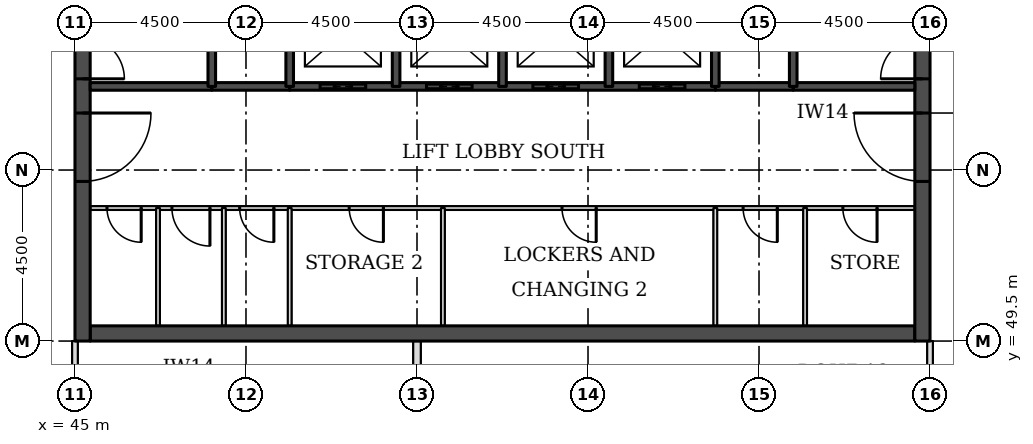
"""IFC4 building model, lengths in metres.
Left out: names, types, materials, properties, quantities, classifications, styles, units other than length and angle.
Written with IfcOpenShell. Run it as: python <this file> out.ifc"""

import sys

from ifc_helpers import new_model, si_unit, direction, frame, frame_2d, origin, place, context, subcontext, project, spatial, rectangle, extrude, element, fill, save


model = new_model("IFC4")
c1 = context("Model", 3, precision=1e-05, world=origin(), true_north=direction((0.0, 1.0)))
c2 = subcontext(c1, "Body", "Model", "MODEL_VIEW")
j1 = project(units=[si_unit("LENGTHUNIT", "METRE"), si_unit("PLANEANGLEUNIT", "RADIAN")], contexts=[c1])
p1 = place(None, origin())
s1 = spatial("IfcSite", under=j1, at=p1, CompositionType="ELEMENT")
p2 = place(p1, origin())
s2 = spatial("IfcBuilding", under=s1, at=p2, CompositionType="ELEMENT")
p3 = place(p2, frame((0.0, 0.0, 192.1)))
s3 = spatial("IfcBuildingStorey", under=s2, at=p3, CompositionType="ELEMENT", Elevation=192.1)
p4 = place(p3, frame((45.4, 49.7, 0.0), z_axis=(0.0, 0.0, 1.0), x_axis=(1.0, 0.0, 0.0)))
e1 = element("IfcWall", 1, at=p4, inside=s3, PredefinedType="SHEAR", context=c2, shape_type="SweptSolid", body=[
    extrude(rectangle(XDim=21.7, YDim=0.4, at=frame_2d((10.85, 0.0))), origin(), (0.0, 0.0, 1.0), 3.7),
])
p5 = place(p3, frame((45.2, 49.5, 0.0), z_axis=(0.0, 0.0, 1.0), x_axis=(0.0, 1.0, 0.0)))
e2 = element("IfcWall", 2, at=p5, inside=s3, PredefinedType="SHEAR", context=c2, shape_type="SweptSolid", body=[
    extrude(rectangle(XDim=22.5, YDim=0.4, at=frame_2d((11.25, 0.0))), origin(), (0.0, 0.0, 1.0), 3.7),
])
p6 = place(p5, frame((4.2, 0.0, 0.0)))
e3 = element("IfcOpeningElement", 3, at=p6, cuts=e2, PredefinedType="OPENING", context=c2, shape_type="SweptSolid", body=[
    extrude(rectangle(XDim=1.8, YDim=2.1, at=frame_2d((0.9, 1.05))), frame((0.0, 0.21, 0.0), z_axis=(0.0, -1.0, 0.0), x_axis=(1.0, 0.0, 0.0)), (0.0, 0.0, 1.0), 0.42),
])
p7 = place(p5, frame((6.9, 0.0, 0.0)))
e4 = element("IfcOpeningElement", 4, at=p7, cuts=e2, PredefinedType="OPENING", context=c2, shape_type="SweptSolid", body=[
    extrude(rectangle(XDim=1.1, YDim=2.1, at=frame_2d((0.55, 1.05))), frame((0.0, 0.21, 0.0), z_axis=(0.0, -1.0, 0.0), x_axis=(1.0, 0.0, 0.0)), (0.0, 0.0, 1.0), 0.42),
])
p8 = place(p5, frame((13.6, 0.0, 0.0)))
e5 = element("IfcOpeningElement", 5, at=p8, cuts=e2, PredefinedType="OPENING", context=c2, shape_type="SweptSolid", body=[
    extrude(rectangle(XDim=1.1, YDim=2.1, at=frame_2d((0.55, 1.05))), frame((0.0, 0.21, 0.0), z_axis=(0.0, -1.0, 0.0), x_axis=(1.0, 0.0, 0.0)), (0.0, 0.0, 1.0), 0.42),
])
p9 = place(p5, frame((16.5, 0.0, 0.0)))
e6 = element("IfcOpeningElement", 6, at=p9, cuts=e2, PredefinedType="OPENING", context=c2, shape_type="SweptSolid", body=[
    extrude(rectangle(XDim=1.8, YDim=2.1, at=frame_2d((0.9, 1.05))), frame((0.0, 0.21, 0.0), z_axis=(0.0, -1.0, 0.0), x_axis=(1.0, 0.0, 0.0)), (0.0, 0.0, 1.0), 0.42),
])
p10 = place(p3, frame((67.3, 49.5, 0.0), z_axis=(0.0, 0.0, 1.0), x_axis=(0.0, 1.0, 0.0)))
e7 = element("IfcWall", 7, at=p10, inside=s3, PredefinedType="SHEAR", context=c2, shape_type="SweptSolid", body=[
    extrude(rectangle(XDim=22.5, YDim=0.4, at=frame_2d((11.25, 0.0))), origin(), (0.0, 0.0, 1.0), 3.7),
])
p11 = place(p10, frame((4.2, 0.0, 0.0)))
e8 = element("IfcOpeningElement", 8, at=p11, cuts=e7, PredefinedType="OPENING", context=c2, shape_type="SweptSolid", body=[
    extrude(rectangle(XDim=1.8, YDim=2.1, at=frame_2d((0.9, 1.05))), frame((0.0, 0.21, 0.0), z_axis=(0.0, -1.0, 0.0), x_axis=(1.0, 0.0, 0.0)), (0.0, 0.0, 1.0), 0.42),
])
p12 = place(p10, frame((6.9, 0.0, 0.0)))
e9 = element("IfcOpeningElement", 9, at=p12, cuts=e7, PredefinedType="OPENING", context=c2, shape_type="SweptSolid", body=[
    extrude(rectangle(XDim=1.1, YDim=2.1, at=frame_2d((0.55, 1.05))), frame((0.0, 0.21, 0.0), z_axis=(0.0, -1.0, 0.0), x_axis=(1.0, 0.0, 0.0)), (0.0, 0.0, 1.0), 0.42),
])
p13 = place(p10, frame((13.6, 0.0, 0.0)))
e10 = element("IfcOpeningElement", 10, at=p13, cuts=e7, PredefinedType="OPENING", context=c2, shape_type="SweptSolid", body=[
    extrude(rectangle(XDim=1.1, YDim=2.1, at=frame_2d((0.55, 1.05))), frame((0.0, 0.21, 0.0), z_axis=(0.0, -1.0, 0.0), x_axis=(1.0, 0.0, 0.0)), (0.0, 0.0, 1.0), 0.42),
])
p14 = place(p10, frame((16.5, 0.0, 0.0)))
e11 = element("IfcOpeningElement", 11, at=p14, cuts=e7, PredefinedType="OPENING", context=c2, shape_type="SweptSolid", body=[
    extrude(rectangle(XDim=1.8, YDim=2.1, at=frame_2d((0.9, 1.05))), frame((0.0, 0.21, 0.0), z_axis=(0.0, -1.0, 0.0), x_axis=(1.0, 0.0, 0.0)), (0.0, 0.0, 1.0), 0.42),
])
p15 = place(p3, frame((54.0, 46.5, 0.0), z_axis=(0.0, 0.0, 1.0), x_axis=(0.0, 1.0, 0.0)))
e12 = element("IfcWall", 12, at=p15, inside=s3, PredefinedType="PARTITIONING", context=c2, shape_type="SweptSolid", body=[
    extrude(rectangle(XDim=3.0, YDim=0.2, at=frame_2d((1.5, 0.0))), origin(), (0.0, 0.0, 1.0), 3.55),
])
for number, where, z_axis, x_axis in (
    (13, (45.0, 48.0, 0.0), (0.0, 0.0, 1.0), (0.0, 1.0, 0.0)),
    (14, (67.5, 48.0, 0.0), (0.0, 0.0, 1.0), (0.0, 1.0, 0.0)),
):
    element("IfcWall", number, at=place(p3, frame(where, z_axis=z_axis, x_axis=x_axis)), inside=s3, PredefinedType="PARTITIONING", context=c2, shape_type="SweptSolid", body=[
        extrude(rectangle(XDim=1.5, YDim=0.15, at=frame_2d((0.75, 0.0))), origin(), (0.0, 0.0, 1.0), 3.022),
    ])
p16 = place(p3, frame((45.4, 53.0, 0.0), z_axis=(0.0, 0.0, 1.0), x_axis=(1.0, 0.0, 0.0)))
e15 = element("IfcWall", 15, at=p16, inside=s3, PredefinedType="PARTITIONING", context=c2, shape_type="SweptSolid", body=[
    extrude(rectangle(XDim=21.7, YDim=0.1, at=frame_2d((10.85, 0.0))), origin(), (0.0, 0.0, 1.0), 3.55),
])
p17 = place(p16, frame((19.806, 0.0, 0.0)))
e16 = element("IfcOpeningElement", 16, at=p17, cuts=e15, PredefinedType="OPENING", context=c2, shape_type="SweptSolid", body=[
    extrude(rectangle(XDim=0.9, YDim=2.1, at=frame_2d((0.45, 1.05))), frame((0.0, 0.06, 0.0), z_axis=(0.0, -1.0, 0.0), x_axis=(1.0, 0.0, 0.0)), (0.0, 0.0, 1.0), 0.12),
])
p18 = place(p16, frame((17.181, 0.0, 0.0)))
e17 = element("IfcOpeningElement", 17, at=p18, cuts=e15, PredefinedType="OPENING", context=c2, shape_type="SweptSolid", body=[
    extrude(rectangle(XDim=0.9, YDim=2.1, at=frame_2d((0.45, 1.05))), frame((0.0, 0.06, 0.0), z_axis=(0.0, -1.0, 0.0), x_axis=(1.0, 0.0, 0.0)), (0.0, 0.0, 1.0), 0.12),
])
p19 = place(p16, frame((0.442, 0.0, 0.0)))
e18 = element("IfcOpeningElement", 18, at=p19, cuts=e15, PredefinedType="OPENING", context=c2, shape_type="SweptSolid", body=[
    extrude(rectangle(XDim=0.9, YDim=2.1, at=frame_2d((0.45, 1.05))), frame((0.0, 0.06, 0.0), z_axis=(0.0, -1.0, 0.0), x_axis=(1.0, 0.0, 0.0)), (0.0, 0.0, 1.0), 0.12),
])
p20 = place(p16, frame((2.151, 0.0, 0.0)))
e19 = element("IfcOpeningElement", 19, at=p20, cuts=e15, PredefinedType="OPENING", context=c2, shape_type="SweptSolid", body=[
    extrude(rectangle(XDim=1.0, YDim=2.1, at=frame_2d((0.5, 1.05))), frame((0.0, 0.06, 0.0), z_axis=(0.0, -1.0, 0.0), x_axis=(1.0, 0.0, 0.0)), (0.0, 0.0, 1.0), 0.12),
])
p21 = place(p16, frame((3.934, 0.0, 0.0)))
e20 = element("IfcOpeningElement", 20, at=p21, cuts=e15, PredefinedType="OPENING", context=c2, shape_type="SweptSolid", body=[
    extrude(rectangle(XDim=0.9, YDim=2.1, at=frame_2d((0.45, 1.05))), frame((0.0, 0.06, 0.0), z_axis=(0.0, -1.0, 0.0), x_axis=(1.0, 0.0, 0.0)), (0.0, 0.0, 1.0), 0.12),
])
p22 = place(p16, frame((6.816, 0.0, 0.0)))
e21 = element("IfcOpeningElement", 21, at=p22, cuts=e15, PredefinedType="OPENING", context=c2, shape_type="SweptSolid", body=[
    extrude(rectangle(XDim=0.9, YDim=2.1, at=frame_2d((0.45, 1.05))), frame((0.0, 0.06, 0.0), z_axis=(0.0, -1.0, 0.0), x_axis=(1.0, 0.0, 0.0)), (0.0, 0.0, 1.0), 0.12),
])
p23 = place(p16, frame((12.416, 0.0, 0.0)))
e22 = element("IfcOpeningElement", 22, at=p23, cuts=e15, PredefinedType="OPENING", context=c2, shape_type="SweptSolid", body=[
    extrude(rectangle(XDim=0.9, YDim=2.1, at=frame_2d((0.45, 1.05))), frame((0.0, 0.06, 0.0), z_axis=(0.0, -1.0, 0.0), x_axis=(1.0, 0.0, 0.0)), (0.0, 0.0, 1.0), 0.12),
])
for number, where, z_axis, x_axis in (
    (23, (48.6, 56.2, 0.0), (0.0, 0.0, 1.0), (1.0, 0.0, 0.0)),
    (24, (61.85, 56.2, 0.0), (0.0, 0.0, 1.0), (1.0, 0.0, 0.0)),
):
    element("IfcWall", number, at=place(p3, frame(where, z_axis=z_axis, x_axis=x_axis)), inside=s3, PredefinedType="SOLIDWALL", context=c2, shape_type="SweptSolid", body=[
        extrude(rectangle(XDim=2.05, YDim=0.2, at=frame_2d((1.025, 0.0))), origin(), (0.0, 0.0, 1.0), 3.55),
    ])
p24 = place(p3, frame((45.4, 56.2, 0.0), z_axis=(0.0, 0.0, 1.0), x_axis=(1.0, 0.0, 0.0)))
e25 = element("IfcWall", 25, at=p24, inside=s3, PredefinedType="SOLIDWALL", context=c2, shape_type="SweptSolid", body=[
    extrude(rectangle(XDim=3.2, YDim=0.2, at=frame_2d((1.6, 0.0))), origin(), (0.0, 0.0, 1.0), 3.55),
])
p25 = place(p3, frame((50.65, 56.2, 0.0), z_axis=(0.0, 0.0, 1.0), x_axis=(1.0, 0.0, 0.0)))
e26 = element("IfcWall", 26, at=p25, inside=s3, PredefinedType="SOLIDWALL", context=c2, shape_type="SweptSolid", body=[
    extrude(rectangle(XDim=11.2, YDim=0.2, at=frame_2d((5.6, 0.0))), origin(), (0.0, 0.0, 1.0), 3.55),
])
p26 = place(p25, frame((0.8, 0.0, 0.0)))
e27 = element("IfcOpeningElement", 27, at=p26, cuts=e26, PredefinedType="OPENING", context=c2, shape_type="SweptSolid", body=[
    extrude(rectangle(XDim=1.2, YDim=2.1, at=frame_2d((0.6, 1.05))), frame((0.0, 0.11, 0.0), z_axis=(0.0, -1.0, 0.0), x_axis=(1.0, 0.0, 0.0)), (0.0, 0.0, 1.0), 0.22),
])
p27 = place(p25, frame((3.6, 0.0, 0.0)))
e28 = element("IfcOpeningElement", 28, at=p27, cuts=e26, PredefinedType="OPENING", context=c2, shape_type="SweptSolid", body=[
    extrude(rectangle(XDim=1.2, YDim=2.1, at=frame_2d((0.6, 1.05))), frame((0.0, 0.11, 0.0), z_axis=(0.0, -1.0, 0.0), x_axis=(1.0, 0.0, 0.0)), (0.0, 0.0, 1.0), 0.22),
])
p28 = place(p25, frame((6.4, 0.0, 0.0)))
e29 = element("IfcOpeningElement", 29, at=p28, cuts=e26, PredefinedType="OPENING", context=c2, shape_type="SweptSolid", body=[
    extrude(rectangle(XDim=1.2, YDim=2.1, at=frame_2d((0.6, 1.05))), frame((0.0, 0.11, 0.0), z_axis=(0.0, -1.0, 0.0), x_axis=(1.0, 0.0, 0.0)), (0.0, 0.0, 1.0), 0.22),
])
p29 = place(p25, frame((9.2, 0.0, 0.0)))
e30 = element("IfcOpeningElement", 30, at=p29, cuts=e26, PredefinedType="OPENING", context=c2, shape_type="SweptSolid", body=[
    extrude(rectangle(XDim=1.2, YDim=2.1, at=frame_2d((0.6, 1.05))), frame((0.0, 0.11, 0.0), z_axis=(0.0, -1.0, 0.0), x_axis=(1.0, 0.0, 0.0)), (0.0, 0.0, 1.0), 0.22),
])
p30 = place(p3, frame((63.9, 56.2, 0.0), z_axis=(0.0, 0.0, 1.0), x_axis=(1.0, 0.0, 0.0)))
e31 = element("IfcWall", 31, at=p30, inside=s3, PredefinedType="SOLIDWALL", context=c2, shape_type="SweptSolid", body=[
    extrude(rectangle(XDim=3.2, YDim=0.2, at=frame_2d((1.6, 0.0))), origin(), (0.0, 0.0, 1.0), 3.55),
])
p31 = place(p3, frame((47.185, 49.9, 0.0), z_axis=(0.0, 0.0, 1.0), x_axis=(0.0, 1.0, 0.0)))
e32 = element("IfcWall", 32, at=p31, inside=s3, PredefinedType="PARTITIONING", context=c2, shape_type="SweptSolid", body=[
    extrude(rectangle(XDim=3.1, YDim=0.1, at=frame_2d((1.55, 0.0))), origin(), (0.0, 0.0, 1.0), 3.55),
])
p32 = place(p3, frame((48.6, 56.2, 0.0), z_axis=(0.0, 0.0, 1.0), x_axis=(0.0, 1.0, 0.0)))
e33 = element("IfcWall", 33, at=p32, inside=s3, PredefinedType="SOLIDWALL", context=c2, shape_type="SweptSolid", body=[
    extrude(rectangle(XDim=5.8, YDim=0.2, at=frame_2d((2.9, 0.0))), origin(), (0.0, 0.0, 1.0), 3.55),
])
for number, where, z_axis, x_axis in (
    (34, (48.917, 49.9, 0.0), (0.0, 0.0, 1.0), (0.0, 1.0, 0.0)),
    (35, (50.65, 49.9, 0.0), (0.0, 0.0, 1.0), (0.0, 1.0, 0.0)),
):
    element("IfcWall", number, at=place(p3, frame(where, z_axis=z_axis, x_axis=x_axis)), inside=s3, PredefinedType="PARTITIONING", context=c2, shape_type="SweptSolid", body=[
        extrude(rectangle(XDim=3.1, YDim=0.1, at=frame_2d((1.55, 0.0))), origin(), (0.0, 0.0, 1.0), 3.55),
    ])
for number, where, z_axis, x_axis in (
    (36, (50.65, 56.2, 0.0), (0.0, 0.0, 1.0), (0.0, 1.0, 0.0)),
    (37, (53.45, 56.2, 0.0), (0.0, 0.0, 1.0), (0.0, 1.0, 0.0)),
):
    element("IfcWall", number, at=place(p3, frame(where, z_axis=z_axis, x_axis=x_axis)), inside=s3, PredefinedType="SOLIDWALL", context=c2, shape_type="SweptSolid", body=[
        extrude(rectangle(XDim=2.8, YDim=0.2, at=frame_2d((1.4, 0.0))), origin(), (0.0, 0.0, 1.0), 3.55),
    ])
p33 = place(p3, frame((54.682, 49.9, 0.0), z_axis=(0.0, 0.0, 1.0), x_axis=(0.0, 1.0, 0.0)))
e38 = element("IfcWall", 38, at=p33, inside=s3, PredefinedType="PARTITIONING", context=c2, shape_type="SweptSolid", body=[
    extrude(rectangle(XDim=3.1, YDim=0.1, at=frame_2d((1.55, 0.0))), origin(), (0.0, 0.0, 1.0), 3.55),
])
for number, where, z_axis, x_axis in (
    (39, (56.25, 56.2, 0.0), (0.0, 0.0, 1.0), (0.0, 1.0, 0.0)),
    (40, (59.05, 56.2, 0.0), (0.0, 0.0, 1.0), (0.0, 1.0, 0.0)),
):
    element("IfcWall", number, at=place(p3, frame(where, z_axis=z_axis, x_axis=x_axis)), inside=s3, PredefinedType="SOLIDWALL", context=c2, shape_type="SweptSolid", body=[
        extrude(rectangle(XDim=2.8, YDim=0.2, at=frame_2d((1.4, 0.0))), origin(), (0.0, 0.0, 1.0), 3.55),
    ])
p34 = place(p3, frame((61.85, 49.9, 0.0), z_axis=(0.0, 0.0, 1.0), x_axis=(0.0, 1.0, 0.0)))
e41 = element("IfcWall", 41, at=p34, inside=s3, PredefinedType="PARTITIONING", context=c2, shape_type="SweptSolid", body=[
    extrude(rectangle(XDim=3.1, YDim=0.1, at=frame_2d((1.55, 0.0))), origin(), (0.0, 0.0, 1.0), 3.55),
])
p35 = place(p3, frame((61.85, 56.2, 0.0), z_axis=(0.0, 0.0, 1.0), x_axis=(0.0, 1.0, 0.0)))
e42 = element("IfcWall", 42, at=p35, inside=s3, PredefinedType="SOLIDWALL", context=c2, shape_type="SweptSolid", body=[
    extrude(rectangle(XDim=2.8, YDim=0.2, at=frame_2d((1.4, 0.0))), origin(), (0.0, 0.0, 1.0), 3.55),
])
p36 = place(p3, frame((63.9, 56.2, 0.0), z_axis=(0.0, 0.0, 1.0), x_axis=(0.0, 1.0, 0.0)))
e43 = element("IfcWall", 43, at=p36, inside=s3, PredefinedType="SOLIDWALL", context=c2, shape_type="SweptSolid", body=[
    extrude(rectangle(XDim=5.8, YDim=0.2, at=frame_2d((2.9, 0.0))), origin(), (0.0, 0.0, 1.0), 3.55),
])
p37 = place(p3, frame((64.212, 49.9, 0.0), z_axis=(0.0, 0.0, 1.0), x_axis=(0.0, 1.0, 0.0)))
e44 = element("IfcWall", 44, at=p37, inside=s3, PredefinedType="PARTITIONING", context=c2, shape_type="SweptSolid", body=[
    extrude(rectangle(XDim=3.1, YDim=0.1, at=frame_2d((1.55, 0.0))), origin(), (0.0, 0.0, 1.0), 3.55),
])
p38 = place(p26, origin())
e45 = element("IfcDoor", 45, at=p38, inside=s3, OperationType="DOUBLE_DOOR_SLIDING", PredefinedType="DOOR", context=c2, shape_type="SweptSolid", body=[
    extrude(rectangle(XDim=1.2, YDim=2.1, at=frame_2d((0.6, 1.05))), frame((0.0, 0.025, 0.0), z_axis=(0.0, -1.0, 0.0), x_axis=(1.0, 0.0, 0.0)), (0.0, 0.0, 1.0), 0.05),
])
fill(e27, e45)
p39 = place(p27, origin())
e46 = element("IfcDoor", 46, at=p39, inside=s3, OperationType="DOUBLE_DOOR_SLIDING", PredefinedType="DOOR", context=c2, shape_type="SweptSolid", body=[
    extrude(rectangle(XDim=1.2, YDim=2.1, at=frame_2d((0.6, 1.05))), frame((0.0, 0.025, 0.0), z_axis=(0.0, -1.0, 0.0), x_axis=(1.0, 0.0, 0.0)), (0.0, 0.0, 1.0), 0.05),
])
fill(e28, e46)
p40 = place(p28, origin())
e47 = element("IfcDoor", 47, at=p40, inside=s3, OperationType="DOUBLE_DOOR_SLIDING", PredefinedType="DOOR", context=c2, shape_type="SweptSolid", body=[
    extrude(rectangle(XDim=1.2, YDim=2.1, at=frame_2d((0.6, 1.05))), frame((0.0, 0.025, 0.0), z_axis=(0.0, -1.0, 0.0), x_axis=(1.0, 0.0, 0.0)), (0.0, 0.0, 1.0), 0.05),
])
fill(e29, e47)
p41 = place(p29, origin())
e48 = element("IfcDoor", 48, at=p41, inside=s3, OperationType="DOUBLE_DOOR_SLIDING", PredefinedType="DOOR", context=c2, shape_type="SweptSolid", body=[
    extrude(rectangle(XDim=1.2, YDim=2.1, at=frame_2d((0.6, 1.05))), frame((0.0, 0.025, 0.0), z_axis=(0.0, -1.0, 0.0), x_axis=(1.0, 0.0, 0.0)), (0.0, 0.0, 1.0), 0.05),
])
fill(e30, e48)
p42 = place(p6, frame((1.8, 0.0, 0.0), z_axis=(0.0, 0.0, 1.0), x_axis=(-1.0, 0.0, 0.0)))
e49 = element("IfcDoor", 49, at=p42, inside=s3, OperationType="SINGLE_SWING_LEFT", PredefinedType="DOOR", context=c2, shape_type="SweptSolid", body=[
    extrude(rectangle(XDim=1.8, YDim=2.1, at=frame_2d((0.9, 1.05))), frame((0.0, 0.025, 0.0), z_axis=(0.0, -1.0, 0.0), x_axis=(1.0, 0.0, 0.0)), (0.0, 0.0, 1.0), 0.05),
])
fill(e3, e49)
p43 = place(p7, frame((1.1, 0.0, 0.0), z_axis=(0.0, 0.0, 1.0), x_axis=(-1.0, 0.0, 0.0)))
e50 = element("IfcDoor", 50, at=p43, inside=s3, OperationType="SINGLE_SWING_RIGHT", PredefinedType="DOOR", context=c2, shape_type="SweptSolid", body=[
    extrude(rectangle(XDim=1.1, YDim=2.1, at=frame_2d((0.55, 1.05))), frame((0.0, 0.025, 0.0), z_axis=(0.0, -1.0, 0.0), x_axis=(1.0, 0.0, 0.0)), (0.0, 0.0, 1.0), 0.05),
])
fill(e4, e50)
p44 = place(p11, origin())
e51 = element("IfcDoor", 51, at=p44, inside=s3, OperationType="SINGLE_SWING_RIGHT", PredefinedType="DOOR", context=c2, shape_type="SweptSolid", body=[
    extrude(rectangle(XDim=1.8, YDim=2.1, at=frame_2d((0.9, 1.05))), frame((0.0, 0.025, 0.0), z_axis=(0.0, -1.0, 0.0), x_axis=(1.0, 0.0, 0.0)), (0.0, 0.0, 1.0), 0.05),
])
fill(e8, e51)
p45 = place(p12, origin())
e52 = element("IfcDoor", 52, at=p45, inside=s3, OperationType="SINGLE_SWING_LEFT", PredefinedType="DOOR", context=c2, shape_type="SweptSolid", body=[
    extrude(rectangle(XDim=1.1, YDim=2.1, at=frame_2d((0.55, 1.05))), frame((0.0, 0.025, 0.0), z_axis=(0.0, -1.0, 0.0), x_axis=(1.0, 0.0, 0.0)), (0.0, 0.0, 1.0), 0.05),
])
fill(e9, e52)
p46 = place(p17, frame((0.9, 0.0, 0.0), z_axis=(0.0, 0.0, 1.0), x_axis=(-1.0, 0.0, 0.0)))
e53 = element("IfcDoor", 53, at=p46, inside=s3, OperationType="SINGLE_SWING_LEFT", PredefinedType="DOOR", context=c2, shape_type="SweptSolid", body=[
    extrude(rectangle(XDim=0.9, YDim=2.1, at=frame_2d((0.45, 1.05))), frame((0.0, 0.025, 0.0), z_axis=(0.0, -1.0, 0.0), x_axis=(1.0, 0.0, 0.0)), (0.0, 0.0, 1.0), 0.05),
])
fill(e16, e53)
p47 = place(p18, frame((0.9, 0.0, 0.0), z_axis=(0.0, 0.0, 1.0), x_axis=(-1.0, 0.0, 0.0)))
e54 = element("IfcDoor", 54, at=p47, inside=s3, OperationType="SINGLE_SWING_LEFT", PredefinedType="DOOR", context=c2, shape_type="SweptSolid", body=[
    extrude(rectangle(XDim=0.9, YDim=2.1, at=frame_2d((0.45, 1.05))), frame((0.0, 0.025, 0.0), z_axis=(0.0, -1.0, 0.0), x_axis=(1.0, 0.0, 0.0)), (0.0, 0.0, 1.0), 0.05),
])
fill(e17, e54)
p48 = place(p19, frame((0.9, 0.0, 0.0), z_axis=(0.0, 0.0, 1.0), x_axis=(-1.0, 0.0, 0.0)))
e55 = element("IfcDoor", 55, at=p48, inside=s3, OperationType="SINGLE_SWING_LEFT", PredefinedType="DOOR", context=c2, shape_type="SweptSolid", body=[
    extrude(rectangle(XDim=0.9, YDim=2.1, at=frame_2d((0.45, 1.05))), frame((0.0, 0.025, 0.0), z_axis=(0.0, -1.0, 0.0), x_axis=(1.0, 0.0, 0.0)), (0.0, 0.0, 1.0), 0.05),
])
fill(e18, e55)
p49 = place(p20, frame((1.0, 0.0, 0.0), z_axis=(0.0, 0.0, 1.0), x_axis=(-1.0, 0.0, 0.0)))
e56 = element("IfcDoor", 56, at=p49, inside=s3, OperationType="SINGLE_SWING_LEFT", PredefinedType="DOOR", context=c2, shape_type="SweptSolid", body=[
    extrude(rectangle(XDim=1.0, YDim=2.1, at=frame_2d((0.5, 1.05))), frame((0.0, 0.025, 0.0), z_axis=(0.0, -1.0, 0.0), x_axis=(1.0, 0.0, 0.0)), (0.0, 0.0, 1.0), 0.05),
])
fill(e19, e56)
p50 = place(p21, frame((0.9, 0.0, 0.0), z_axis=(0.0, 0.0, 1.0), x_axis=(-1.0, 0.0, 0.0)))
e57 = element("IfcDoor", 57, at=p50, inside=s3, OperationType="SINGLE_SWING_LEFT", PredefinedType="DOOR", context=c2, shape_type="SweptSolid", body=[
    extrude(rectangle(XDim=0.9, YDim=2.1, at=frame_2d((0.45, 1.05))), frame((0.0, 0.025, 0.0), z_axis=(0.0, -1.0, 0.0), x_axis=(1.0, 0.0, 0.0)), (0.0, 0.0, 1.0), 0.05),
])
fill(e20, e57)
p51 = place(p22, frame((0.9, 0.0, 0.0), z_axis=(0.0, 0.0, 1.0), x_axis=(-1.0, 0.0, 0.0)))
e58 = element("IfcDoor", 58, at=p51, inside=s3, OperationType="SINGLE_SWING_LEFT", PredefinedType="DOOR", context=c2, shape_type="SweptSolid", body=[
    extrude(rectangle(XDim=0.9, YDim=2.1, at=frame_2d((0.45, 1.05))), frame((0.0, 0.025, 0.0), z_axis=(0.0, -1.0, 0.0), x_axis=(1.0, 0.0, 0.0)), (0.0, 0.0, 1.0), 0.05),
])
fill(e21, e58)
p52 = place(p23, frame((0.9, 0.0, 0.0), z_axis=(0.0, 0.0, 1.0), x_axis=(-1.0, 0.0, 0.0)))
e59 = element("IfcDoor", 59, at=p52, inside=s3, OperationType="SINGLE_SWING_LEFT", PredefinedType="DOOR", context=c2, shape_type="SweptSolid", body=[
    extrude(rectangle(XDim=0.9, YDim=2.1, at=frame_2d((0.45, 1.05))), frame((0.0, 0.025, 0.0), z_axis=(0.0, -1.0, 0.0), x_axis=(1.0, 0.0, 0.0)), (0.0, 0.0, 1.0), 0.05),
])
fill(e22, e59)
save(model, sys.argv[1])
